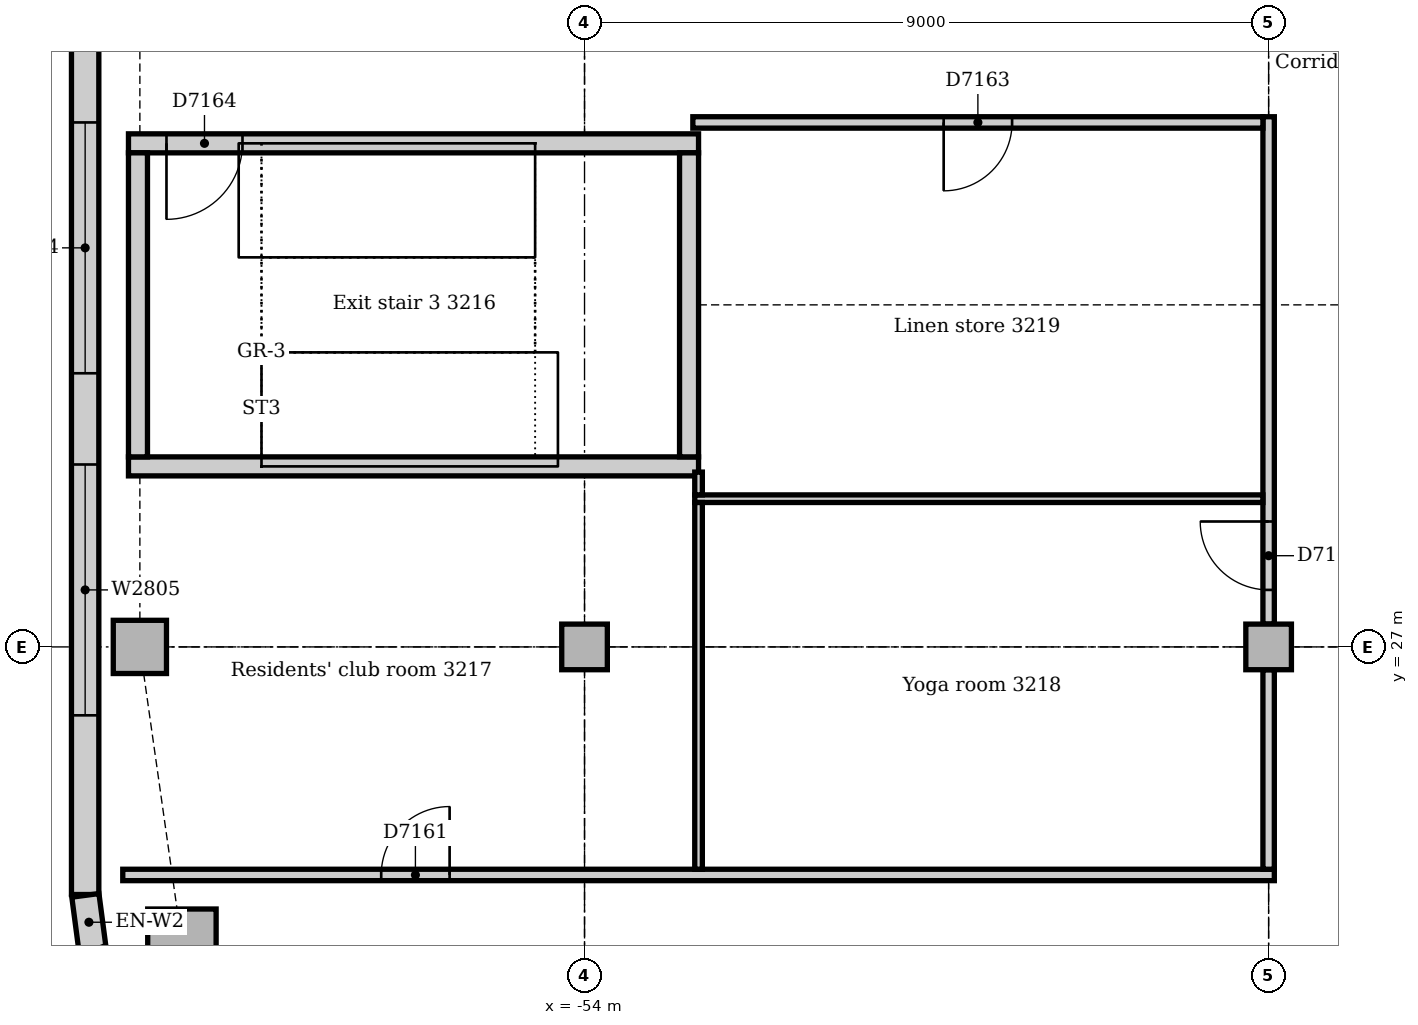
"""IFC4 building model, lengths in metres.
Left out: names, types, materials, properties, quantities, classifications, styles, units other than length and angle.
Written with IfcOpenShell. Run it as: python <this file> out.ifc"""

import sys

from ifc_helpers import new_model, si_unit, direction, frame, frame_2d, origin, origin_2d, place, context, subcontext, project, spatial, rectangle, extrude, element, fill, save


model = new_model("IFC4")
c1 = context("Model", 3, precision=1e-05, world=origin(), true_north=direction((0.0, 1.0)))
c2 = subcontext(c1, "Body", "Model", "MODEL_VIEW")
j1 = project(units=[si_unit("LENGTHUNIT", "METRE"), si_unit("PLANEANGLEUNIT", "RADIAN")], contexts=[c1])
p1 = place(None, origin())
s1 = spatial("IfcSite", under=j1, at=p1, CompositionType="ELEMENT")
p2 = place(p1, origin())
s2 = spatial("IfcBuilding", under=s1, at=p2, CompositionType="ELEMENT")
p3 = place(p2, frame((0.0, 0.0, 136.0)))
s3 = spatial("IfcBuildingStorey", under=s2, at=p3, CompositionType="ELEMENT", Elevation=136.0)
p4 = place(p3, frame((-60.0, 29.375, 0.0), z_axis=(0.0, 0.0, 1.0), x_axis=(1.0, 0.0, 0.0)))
e1 = element("IfcWall", 1, at=p4, inside=s3, PredefinedType="SOLIDWALL", context=c2, shape_type="SweptSolid", body=[
    extrude(rectangle(XDim=7.5, YDim=0.25, at=frame_2d((3.75, 0.0))), origin(), (0.0, 0.0, 1.0), 4.0),
])
p5 = place(p3, frame((-52.5, 33.625, 0.0), z_axis=(0.0, 0.0, 1.0), x_axis=(-1.0, 0.0, 0.0)))
e2 = element("IfcWall", 2, at=p5, inside=s3, PredefinedType="SOLIDWALL", context=c2, shape_type="SweptSolid", body=[
    extrude(rectangle(XDim=7.5, YDim=0.25, at=frame_2d((3.75, 0.0))), origin(), (0.0, 0.0, 1.0), 4.0),
])
p6 = place(p5, frame((6.0, 0.0, 0.0)))
e3 = element("IfcOpeningElement", 3, at=p6, cuts=e2, PredefinedType="OPENING", context=c2, shape_type="SweptSolid", body=[
    extrude(rectangle(XDim=1.0, YDim=2.1, at=frame_2d((0.5, 1.05))), frame((0.0, 0.135, 0.0), z_axis=(0.0, -1.0, 0.0), x_axis=(1.0, 0.0, 0.0)), (0.0, 0.0, 1.0), 0.27),
])
for number, where, z_axis, x_axis in (
    (4, (-52.625, 29.5, 0.0), (0.0, 0.0, 1.0), (0.0, 1.0, 0.0)),
    (5, (-59.875, 33.5, 0.0), (0.0, 0.0, 1.0), (0.0, -1.0, 0.0)),
):
    element("IfcWall", number, at=place(p3, frame(where, z_axis=z_axis, x_axis=x_axis)), inside=s3, PredefinedType="SOLIDWALL", context=c2, shape_type="SweptSolid", body=[
        extrude(rectangle(XDim=4.0, YDim=0.25, at=frame_2d((2.0, 0.0))), origin(), (0.0, 0.0, 1.0), 4.0),
    ])
p7 = place(p3, frame((-59.297, 23.102, 0.0), z_axis=(0.0, 0.0, 1.0), x_axis=(1.0, 0.0, 0.0)))
e6 = element("IfcColumn", 6, at=p7, inside=s3, PredefinedType="COLUMN", context=c2, shape_type="SweptSolid", body=[
    extrude(rectangle(XDim=0.9, YDim=0.9, at=origin_2d()), origin(), (0.0, 0.0, 1.0), 3.85),
])
p8 = place(p3, frame((-59.85, 27.0, 0.0), z_axis=(0.0, 0.0, 1.0), x_axis=(1.0, 0.0, 0.0)))
e7 = element("IfcColumn", 7, at=p8, inside=s3, PredefinedType="COLUMN", context=c2, shape_type="SweptSolid", body=[
    extrude(rectangle(XDim=0.7, YDim=0.7, at=origin_2d()), origin(), (0.0, 0.0, 1.0), 3.85),
])
for number, where, z_axis, x_axis in (
    (8, (-54.0, 27.0, 0.0), (0.0, 0.0, 1.0), (1.0, 0.0, 0.0)),
    (9, (-45.0, 27.0, 0.0), (0.0, 0.0, 1.0), (1.0, 0.0, 0.0)),
):
    element("IfcColumn", number, at=place(p3, frame(where, z_axis=z_axis, x_axis=x_axis)), inside=s3, PredefinedType="COLUMN", context=c2, shape_type="SweptSolid", body=[
        extrude(rectangle(XDim=0.6, YDim=0.6, at=origin_2d()), origin(), (0.0, 0.0, 1.0), 3.85),
    ])
p9 = place(p3, frame((-60.57, 45.257, 0.0), z_axis=(0.0, 0.0, 1.0), x_axis=(0.0, -1.0, 0.0)))
e10 = element("IfcWall", 10, at=p9, inside=s3, PredefinedType="STANDARD", context=c2, shape_type="SweptSolid", body=[
    extrude(rectangle(XDim=21.515, YDim=0.36, at=frame_2d((10.757, 0.0))), origin(), (0.0, 0.0, 1.0), 3.85),
])
p10 = place(p9, frame((3.107, 0.0, 0.9)))
e11 = element("IfcOpeningElement", 11, at=p10, cuts=e10, PredefinedType="OPENING", context=c2, shape_type="SweptSolid", body=[
    extrude(rectangle(XDim=1.8, YDim=1.6, at=frame_2d((0.9, 0.8))), frame((0.0, 0.19, 0.0), z_axis=(0.0, -1.0, 0.0), x_axis=(1.0, 0.0, 0.0)), (0.0, 0.0, 1.0), 0.38),
])
p11 = place(p9, frame((6.857, 0.0, 0.9)))
e12 = element("IfcOpeningElement", 12, at=p11, cuts=e10, PredefinedType="OPENING", context=c2, shape_type="SweptSolid", body=[
    extrude(rectangle(XDim=3.3, YDim=1.6, at=frame_2d((1.65, 0.8))), frame((0.0, 0.19, 0.0), z_axis=(0.0, -1.0, 0.0), x_axis=(1.0, 0.0, 0.0)), (0.0, 0.0, 1.0), 0.38),
])
p12 = place(p9, frame((11.357, 0.0, 0.9)))
e13 = element("IfcOpeningElement", 13, at=p12, cuts=e10, PredefinedType="OPENING", context=c2, shape_type="SweptSolid", body=[
    extrude(rectangle(XDim=3.3, YDim=1.6, at=frame_2d((1.65, 0.8))), frame((0.0, 0.19, 0.0), z_axis=(0.0, -1.0, 0.0), x_axis=(1.0, 0.0, 0.0)), (0.0, 0.0, 1.0), 0.38),
])
p13 = place(p9, frame((15.857, 0.0, 0.9)))
e14 = element("IfcOpeningElement", 14, at=p13, cuts=e10, PredefinedType="OPENING", context=c2, shape_type="SweptSolid", body=[
    extrude(rectangle(XDim=3.3, YDim=1.6, at=frame_2d((1.65, 0.8))), frame((0.0, 0.19, 0.0), z_axis=(0.0, -1.0, 0.0), x_axis=(1.0, 0.0, 0.0)), (0.0, 0.0, 1.0), 0.38),
])
p14 = place(p3, frame((-60.567, 23.731, 0.0), z_axis=(0.0, 0.0, 1.0), x_axis=(0.13055608231, -0.99144092581, 0.0)))
e15 = element("IfcWall", 15, at=p14, inside=s3, PredefinedType="STANDARD", context=c2, shape_type="SweptSolid", body=[
    extrude(rectangle(XDim=0.713, YDim=0.36, at=frame_2d((0.356, 0.0))), origin(), (0.0, 0.0, 1.0), 3.85),
])
p15 = place(p3, frame((-60.075, 24.0, 0.0), z_axis=(0.0, 0.0, 1.0), x_axis=(1.0, 0.0, 0.0)))
e16 = element("IfcWall", 16, at=p15, inside=s3, PredefinedType="PARTITIONING", context=c2, shape_type="SweptSolid", body=[
    extrude(rectangle(XDim=15.15, YDim=0.15, at=frame_2d((7.575, 0.0))), origin(), (0.0, 0.0, 1.0), 3.85),
])
p16 = place(p15, frame((3.4, 0.0, 0.0)))
e17 = element("IfcOpeningElement", 17, at=p16, cuts=e16, PredefinedType="OPENING", context=c2, shape_type="SweptSolid", body=[
    extrude(rectangle(XDim=0.9, YDim=2.1, at=frame_2d((0.45, 1.05))), frame((0.0, 0.085, 0.0), z_axis=(0.0, -1.0, 0.0), x_axis=(1.0, 0.0, 0.0)), (0.0, 0.0, 1.0), 0.17),
])
p17 = place(p3, frame((-45.0, 24.075, 0.0), z_axis=(0.0, 0.0, 1.0), x_axis=(0.0, 1.0, 0.0)))
e18 = element("IfcWall", 18, at=p17, inside=s3, PredefinedType="PARTITIONING", context=c2, shape_type="SweptSolid", body=[
    extrude(rectangle(XDim=2.625, YDim=0.15, at=frame_2d((1.312, 0.0))), origin(), (0.0, 0.0, 1.0), 3.362),
])
p18 = place(p3, frame((-45.0, 27.3, 0.0), z_axis=(0.0, 0.0, 1.0), x_axis=(0.0, 1.0, 0.0)))
e19 = element("IfcWall", 19, at=p18, inside=s3, PredefinedType="PARTITIONING", context=c2, shape_type="SweptSolid", body=[
    extrude(rectangle(XDim=6.675, YDim=0.15, at=frame_2d((3.337, 0.0))), origin(), (0.0, 0.0, 1.0), 3.362),
])
p19 = place(p18, frame((0.45, 0.0, 0.0)))
e20 = element("IfcOpeningElement", 20, at=p19, cuts=e19, PredefinedType="OPENING", context=c2, shape_type="SweptSolid", body=[
    extrude(rectangle(XDim=0.9, YDim=2.1, at=frame_2d((0.45, 1.05))), frame((0.0, 0.085, 0.0), z_axis=(0.0, -1.0, 0.0), x_axis=(1.0, 0.0, 0.0)), (0.0, 0.0, 1.0), 0.17),
])
p20 = place(p3, frame((-52.575, 33.9, 0.0), z_axis=(0.0, 0.0, 1.0), x_axis=(1.0, 0.0, 0.0)))
e21 = element("IfcWall", 21, at=p20, inside=s3, PredefinedType="PARTITIONING", context=c2, shape_type="SweptSolid", body=[
    extrude(rectangle(XDim=7.5, YDim=0.15, at=frame_2d((3.75, 0.0))), origin(), (0.0, 0.0, 1.0), 3.85),
])
p21 = place(p20, frame((3.3, 0.0, 0.0)))
e22 = element("IfcOpeningElement", 22, at=p21, cuts=e21, PredefinedType="OPENING", context=c2, shape_type="SweptSolid", body=[
    extrude(rectangle(XDim=0.9, YDim=2.1, at=frame_2d((0.45, 1.05))), frame((0.0, 0.085, 0.0), z_axis=(0.0, -1.0, 0.0), x_axis=(1.0, 0.0, 0.0)), (0.0, 0.0, 1.0), 0.17),
])
p22 = place(p3, frame((-52.55, 28.95, 0.0), z_axis=(0.0, 0.0, 1.0), x_axis=(1.0, 0.0, 0.0)))
e23 = element("IfcWall", 23, at=p22, inside=s3, PredefinedType="PARTITIONING", context=c2, shape_type="SweptSolid", body=[
    extrude(rectangle(XDim=7.475, YDim=0.1, at=frame_2d((3.737, 0.0))), origin(), (0.0, 0.0, 1.0), 3.85),
])
p23 = place(p3, frame((-52.5, 29.0, 0.0), z_axis=(0.0, 0.0, 1.0), x_axis=(0.0, 1.0, 0.0)))
e24 = element("IfcWall", 24, at=p23, inside=s3, PredefinedType="PARTITIONING", context=c2, shape_type="SweptSolid", body=[
    extrude(rectangle(XDim=0.3, YDim=0.1, at=frame_2d((0.15, 0.0))), origin(), (0.0, 0.0, 1.0), 3.85),
])
p24 = place(p3, frame((-52.5, 24.075, 0.0), z_axis=(0.0, 0.0, 1.0), x_axis=(0.0, 1.0, 0.0)))
e25 = element("IfcWall", 25, at=p24, inside=s3, PredefinedType="PARTITIONING", context=c2, shape_type="SweptSolid", body=[
    extrude(rectangle(XDim=4.825, YDim=0.1, at=frame_2d((2.413, 0.0))), origin(), (0.0, 0.0, 1.0), 3.85),
])
p25 = place(p12, origin())
e26 = element("IfcWindow", 26, at=p25, inside=s3, PartitioningType="SINGLE_PANEL", PredefinedType="WINDOW", context=c2, shape_type="SweptSolid", body=[
    extrude(rectangle(XDim=3.3, YDim=1.6, at=frame_2d((1.65, 0.8))), frame((0.0, 0.13, 0.0), z_axis=(0.0, -1.0, 0.0), x_axis=(1.0, 0.0, 0.0)), (0.0, 0.0, 1.0), 0.06),
])
fill(e13, e26)
p26 = place(p13, origin())
e27 = element("IfcWindow", 27, at=p26, inside=s3, PartitioningType="SINGLE_PANEL", PredefinedType="WINDOW", context=c2, shape_type="SweptSolid", body=[
    extrude(rectangle(XDim=3.3, YDim=1.6, at=frame_2d((1.65, 0.8))), frame((0.0, 0.13, 0.0), z_axis=(0.0, -1.0, 0.0), x_axis=(1.0, 0.0, 0.0)), (0.0, 0.0, 1.0), 0.06),
])
fill(e14, e27)
p27 = place(p16, origin())
e28 = element("IfcDoor", 28, at=p27, inside=s3, OperationType="SINGLE_SWING_RIGHT", PredefinedType="DOOR", context=c2, shape_type="SweptSolid", body=[
    extrude(rectangle(XDim=0.9, YDim=2.1, at=frame_2d((0.45, 1.05))), frame((0.0, 0.025, 0.0), z_axis=(0.0, -1.0, 0.0), x_axis=(1.0, 0.0, 0.0)), (0.0, 0.0, 1.0), 0.05),
])
fill(e17, e28)
p28 = place(p19, origin())
e29 = element("IfcDoor", 29, at=p28, inside=s3, OperationType="SINGLE_SWING_RIGHT", PredefinedType="DOOR", context=c2, shape_type="SweptSolid", body=[
    extrude(rectangle(XDim=0.9, YDim=2.1, at=frame_2d((0.45, 1.05))), frame((0.0, 0.025, 0.0), z_axis=(0.0, -1.0, 0.0), x_axis=(1.0, 0.0, 0.0)), (0.0, 0.0, 1.0), 0.05),
])
fill(e20, e29)
p29 = place(p21, frame((0.9, 0.0, 0.0), z_axis=(0.0, 0.0, 1.0), x_axis=(-1.0, 0.0, 0.0)))
e30 = element("IfcDoor", 30, at=p29, inside=s3, OperationType="SINGLE_SWING_RIGHT", PredefinedType="DOOR", context=c2, shape_type="SweptSolid", body=[
    extrude(rectangle(XDim=0.9, YDim=2.1, at=frame_2d((0.45, 1.05))), frame((0.0, 0.025, 0.0), z_axis=(0.0, -1.0, 0.0), x_axis=(1.0, 0.0, 0.0)), (0.0, 0.0, 1.0), 0.05),
])
fill(e22, e30)
p30 = place(p6, origin())
e31 = element("IfcDoor", 31, at=p30, inside=s3, OperationType="SINGLE_SWING_RIGHT", PredefinedType="DOOR", context=c2, shape_type="SweptSolid", body=[
    extrude(rectangle(XDim=1.0, YDim=2.1, at=frame_2d((0.5, 1.05))), frame((0.0, 0.025, 0.0), z_axis=(0.0, -1.0, 0.0), x_axis=(1.0, 0.0, 0.0)), (0.0, 0.0, 1.0), 0.05),
])
fill(e3, e31)
save(model, sys.argv[1])
